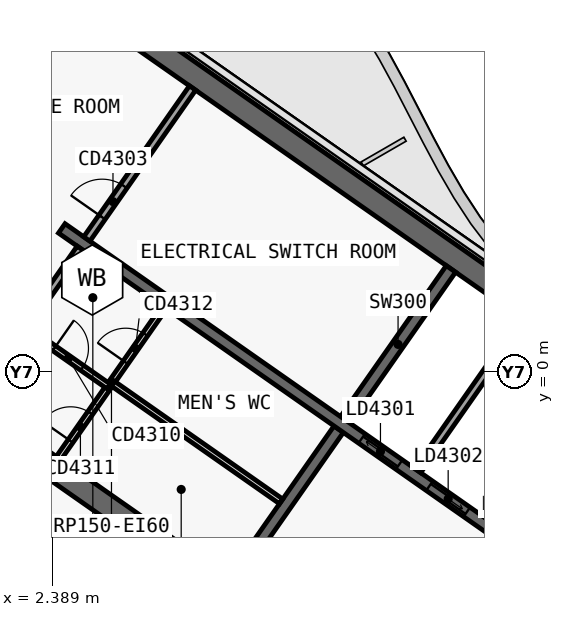
"""IFC4 building model, lengths in metres.
Left out: names, types, materials, properties, quantities, classifications, styles, units other than length and angle.
Written with IfcOpenShell. Run it as: python <this file> out.ifc"""

import sys

from ifc_helpers import new_model, si_unit, direction, frame, frame_2d, origin, place, context, subcontext, project, spatial, polyline, rectangle, outline, extrude, element, fill, save


model = new_model("IFC4")
c1 = context("Model", 3, precision=1e-05, world=origin(), true_north=direction((0.0, 1.0)))
c2 = subcontext(c1, "Body", "Model", "MODEL_VIEW")
j1 = project(units=[si_unit("LENGTHUNIT", "METRE"), si_unit("PLANEANGLEUNIT", "RADIAN")], contexts=[c1])
p1 = place(None, origin())
s1 = spatial("IfcSite", under=j1, at=p1, CompositionType="ELEMENT")
p2 = place(p1, origin())
s2 = spatial("IfcBuilding", under=s1, at=p2, CompositionType="ELEMENT")
p3 = place(p2, frame((0.0, 0.0, 241.0)))
s3 = spatial("IfcBuildingStorey", under=s2, at=p3, CompositionType="ELEMENT", Elevation=241.0)
p4 = place(p3, frame((0.028, 12.066, 0.0), z_axis=(0.0, 0.0, 1.0), x_axis=(0.819151382952, -0.573577380837, 0.0)))
e1 = element("IfcWall", 1, at=p4, inside=s3, PredefinedType="SHEAR", context=c2, shape_type="SweptSolid", body=[
    extrude(outline(polyline([(33.898, 0.3), (0.0, 0.3), (0.42, -0.3), (33.898, -0.3), (33.898, 0.3)])), origin(), (0.0, 0.0, 1.0), 3.9),
])
p5 = place(p3, frame((0.028, -0.874, 0.0), z_axis=(0.0, 0.0, 1.0), x_axis=(0.819150035022, -0.573579305871, 0.0)))
e2 = element("IfcWall", 2, at=p5, inside=s3, PredefinedType="SHEAR", context=c2, shape_type="SweptSolid", body=[
    extrude(outline(polyline([(26.476, 0.3), (0.0, 0.3), (0.42, -0.3), (26.476, -0.3), (26.476, 0.3)])), origin(), (0.0, 0.0, 1.0), 3.9),
])
p6 = place(p5, frame((0.826, 0.0, 0.0)))
e3 = element("IfcOpeningElement", 3, at=p6, cuts=e2, PredefinedType="OPENING", context=c2, shape_type="SweptSolid", body=[
    extrude(rectangle(XDim=1.5, YDim=2.1, at=frame_2d((0.75, 1.05))), frame((0.0, 0.31, 0.0), z_axis=(0.0, -1.0, 0.0), x_axis=(1.0, 0.0, 0.0)), (0.0, 0.0, 1.0), 0.62),
])
p7 = place(p5, frame((12.226, 0.0, 0.0)))
e4 = element("IfcOpeningElement", 4, at=p7, cuts=e2, PredefinedType="OPENING", context=c2, shape_type="SweptSolid", body=[
    extrude(rectangle(XDim=1.5, YDim=2.1, at=frame_2d((0.75, 1.05))), frame((0.0, 0.31, 0.0), z_axis=(0.0, -1.0, 0.0), x_axis=(1.0, 0.0, 0.0)), (0.0, 0.0, 1.0), 0.62),
])
p8 = place(p3, frame((7.143, -5.49, 0.0), z_axis=(0.0, 0.0, 1.0), x_axis=(0.573617744349, 0.819123118565, 0.0)))
e5 = element("IfcWall", 5, at=p8, inside=s3, PredefinedType="SHEAR", context=c2, shape_type="SweptSolid", body=[
    extrude(outline(polyline([(0.0, 0.15), (0.0, -0.15), (4.85, -0.15), (4.85, 0.15), (0.0, 0.15)])), origin(), (0.0, 0.0, 1.0), 3.9),
])
p9 = place(p3, frame((10.097, -1.271, 0.0), z_axis=(0.0, 0.0, 1.0), x_axis=(0.573560315113, 0.819163332265, 0.0)))
e6 = element("IfcWall", 6, at=p9, inside=s3, PredefinedType="SHEAR", context=c2, shape_type="SweptSolid", body=[
    extrude(outline(polyline([(4.85, -0.15), (4.85, 0.15), (0.0, 0.15), (0.0, -0.15), (4.85, -0.15)])), origin(), (0.0, 0.0, 1.0), 3.9),
])
p10 = place(p3, frame((2.638, 3.768, 0.0), z_axis=(0.0, 0.0, 1.0), x_axis=(0.819155014212, -0.573572194837, 0.0)))
e7 = element("IfcWall", 7, at=p10, inside=s3, PredefinedType="SHEAR", context=c2, shape_type="SweptSolid", body=[
    extrude(outline(polyline([(0.0, 0.15), (0.0, -0.15), (26.4, -0.15), (26.4, 0.15), (0.0, 0.15)])), origin(), (0.0, 0.0, 1.0), 3.9),
])
p11 = place(p10, frame((9.637, 0.0, 0.0)))
e8 = element("IfcOpeningElement", 8, at=p11, cuts=e7, PredefinedType="OPENING", context=c2, shape_type="SweptSolid", body=[
    extrude(rectangle(XDim=1.2, YDim=2.1, at=frame_2d((0.6, 1.05))), frame((0.0, 0.16, 0.0), z_axis=(0.0, -1.0, 0.0), x_axis=(1.0, 0.0, 0.0)), (0.0, 0.0, 1.0), 0.32),
])
p12 = place(p10, frame((11.812, 0.0, 0.0)))
e9 = element("IfcOpeningElement", 9, at=p12, cuts=e7, PredefinedType="OPENING", context=c2, shape_type="SweptSolid", body=[
    extrude(rectangle(XDim=1.2, YDim=2.1, at=frame_2d((0.6, 1.05))), frame((0.0, 0.16, 0.0), z_axis=(0.0, -1.0, 0.0), x_axis=(1.0, 0.0, 0.0)), (0.0, 0.0, 1.0), 0.32),
])
p13 = place(p10, frame((13.988, 0.0, 0.0)))
e10 = element("IfcOpeningElement", 10, at=p13, cuts=e7, PredefinedType="OPENING", context=c2, shape_type="SweptSolid", body=[
    extrude(rectangle(XDim=1.2, YDim=2.1, at=frame_2d((0.6, 1.05))), frame((0.0, 0.16, 0.0), z_axis=(0.0, -1.0, 0.0), x_axis=(1.0, 0.0, 0.0)), (0.0, 0.0, 1.0), 0.32),
])
p14 = place(p10, frame((16.262, 0.0, 0.0)))
e11 = element("IfcOpeningElement", 11, at=p14, cuts=e7, PredefinedType="OPENING", context=c2, shape_type="SweptSolid", body=[
    extrude(rectangle(XDim=1.0, YDim=2.1, at=frame_2d((0.5, 1.05))), frame((0.0, 0.16, 0.0), z_axis=(0.0, -1.0, 0.0), x_axis=(1.0, 0.0, 0.0)), (0.0, 0.0, 1.0), 0.32),
])
p15 = place(p3, frame((12.001, -2.605, 0.0), z_axis=(0.0, 0.0, 1.0), x_axis=(0.573560315113, 0.819163332265, 0.0)))
e12 = element("IfcWall", 12, at=p15, inside=s3, PredefinedType="SOLIDWALL", context=c2, shape_type="SweptSolid", body=[
    extrude(rectangle(XDim=4.85, YDim=0.2, at=frame_2d((2.425, 0.0))), origin(), (0.0, 0.0, 1.0), 3.9),
])
p16 = place(p3, frame((13.783, -3.852, 0.0), z_axis=(0.0, 0.0, 1.0), x_axis=(0.573594092424, 0.81913968109, 0.0)))
e13 = element("IfcWall", 13, at=p16, inside=s3, PredefinedType="SOLIDWALL", context=c2, shape_type="SweptSolid", body=[
    extrude(rectangle(XDim=4.85, YDim=0.2, at=frame_2d((2.425, 0.0))), origin(), (0.0, 0.0, 1.0), 3.9),
])
p17 = place(p3, frame((2.556, -2.278, 0.0), z_axis=(0.0, 0.0, 1.0), x_axis=(0.573560315113, 0.819163332265, 0.0)))
e14 = element("IfcWall", 14, at=p17, inside=s3, PredefinedType="PARTITIONING", context=c2, shape_type="SweptSolid", body=[
    extrude(rectangle(XDim=4.85, YDim=0.15, at=frame_2d((2.425, 0.0))), origin(), (0.0, 0.0, 1.0), 3.62),
])
p18 = place(p17, frame((0.55, 0.0, 0.0)))
e15 = element("IfcOpeningElement", 15, at=p18, cuts=e14, PredefinedType="OPENING", context=c2, shape_type="SweptSolid", body=[
    extrude(rectangle(XDim=0.9, YDim=2.1, at=frame_2d((0.45, 1.05))), frame((0.0, 0.085, 0.0), z_axis=(0.0, -1.0, 0.0), x_axis=(1.0, 0.0, 0.0)), (0.0, 0.0, 1.0), 0.17),
])
p19 = place(p17, frame((3.075, 0.0, 0.0)))
e16 = element("IfcOpeningElement", 16, at=p19, cuts=e14, PredefinedType="OPENING", context=c2, shape_type="SweptSolid", body=[
    extrude(rectangle(XDim=0.9, YDim=2.1, at=frame_2d((0.45, 1.05))), frame((0.0, 0.085, 0.0), z_axis=(0.0, -1.0, 0.0), x_axis=(1.0, 0.0, 0.0)), (0.0, 0.0, 1.0), 0.17),
])
p20 = place(p3, frame((1.745, 1.097, 0.0), z_axis=(0.0, 0.0, 1.0), x_axis=(0.819178980414, -0.573537965655, 0.0)))
e17 = element("IfcWall", 17, at=p20, inside=s3, PredefinedType="PARTITIONING", context=c2, shape_type="SweptSolid", body=[
    extrude(rectangle(XDim=2.6, YDim=0.15, at=frame_2d((1.3, 0.0))), origin(), (0.0, 0.0, 1.0), 3.62),
])
p21 = place(p20, frame((0.85, 0.0, 0.0)))
e18 = element("IfcOpeningElement", 18, at=p21, cuts=e17, PredefinedType="OPENING", context=c2, shape_type="SweptSolid", body=[
    extrude(rectangle(XDim=0.9, YDim=2.1, at=frame_2d((0.45, 1.05))), frame((0.0, 0.085, 0.0), z_axis=(0.0, -1.0, 0.0), x_axis=(1.0, 0.0, 0.0)), (0.0, 0.0, 1.0), 0.17),
])
p22 = place(p3, frame((3.947, -0.292, 0.0), z_axis=(0.0, 0.0, 1.0), x_axis=(0.819151939971, -0.573576585332, 0.0)))
e19 = element("IfcWall", 19, at=p22, inside=s3, PredefinedType="PARTITIONING", context=c2, shape_type="SweptSolid", body=[
    extrude(rectangle(XDim=5.45, YDim=0.15, at=frame_2d((2.725, 0.0))), origin(), (0.0, 0.0, 1.0), 3.62),
])
p23 = place(p3, frame((0.344, -0.729, 0.0), z_axis=(0.0, 0.0, 1.0), x_axis=(0.573560315113, 0.819163332265, 0.0)))
e20 = element("IfcWall", 20, at=p23, inside=s3, PredefinedType="SOLIDWALL", context=c2, shape_type="SweptSolid", body=[
    extrude(rectangle(XDim=4.85, YDim=0.2, at=frame_2d((2.425, 0.0))), origin(), (0.0, 0.0, 1.0), 3.62),
])
p24 = place(p23, frame((0.55, 0.0, 0.0)))
e21 = element("IfcOpeningElement", 21, at=p24, cuts=e20, PredefinedType="OPENING", context=c2, shape_type="SweptSolid", body=[
    extrude(rectangle(XDim=0.9, YDim=2.1, at=frame_2d((0.45, 1.05))), frame((0.0, 0.11, 0.0), z_axis=(0.0, -1.0, 0.0), x_axis=(1.0, 0.0, 0.0)), (0.0, 0.0, 1.0), 0.22),
])
p25 = place(p3, frame((3.298, 3.49, 0.0), z_axis=(0.0, 0.0, 1.0), x_axis=(0.573560315113, 0.819163332265, 0.0)))
e22 = element("IfcWall", 22, at=p25, inside=s3, PredefinedType="SOLIDWALL", context=c2, shape_type="SweptSolid", body=[
    extrude(rectangle(XDim=4.85, YDim=0.2, at=frame_2d((2.425, 0.0))), origin(), (0.0, 0.0, 1.0), 3.62),
])
p26 = place(p25, frame((0.7, 0.0, 0.0)))
e23 = element("IfcOpeningElement", 23, at=p26, cuts=e22, PredefinedType="OPENING", context=c2, shape_type="SweptSolid", body=[
    extrude(rectangle(XDim=1.0, YDim=2.1, at=frame_2d((0.5, 1.05))), frame((0.0, 0.11, 0.0), z_axis=(0.0, -1.0, 0.0), x_axis=(1.0, 0.0, 0.0)), (0.0, 0.0, 1.0), 0.22),
])
p27 = place(p11, origin())
e24 = element("IfcDoor", 24, at=p27, inside=s3, OperationType="SLIDING_TO_LEFT", PredefinedType="DOOR", context=c2, shape_type="SweptSolid", body=[
    extrude(rectangle(XDim=1.2, YDim=2.1, at=frame_2d((0.6, 1.05))), frame((0.0, 0.025, 0.0), z_axis=(0.0, -1.0, 0.0), x_axis=(1.0, 0.0, 0.0)), (0.0, 0.0, 1.0), 0.05),
])
fill(e8, e24)
p28 = place(p12, origin())
e25 = element("IfcDoor", 25, at=p28, inside=s3, OperationType="SLIDING_TO_RIGHT", PredefinedType="DOOR", context=c2, shape_type="SweptSolid", body=[
    extrude(rectangle(XDim=1.2, YDim=2.1, at=frame_2d((0.6, 1.05))), frame((0.0, 0.025, 0.0), z_axis=(0.0, -1.0, 0.0), x_axis=(1.0, 0.0, 0.0)), (0.0, 0.0, 1.0), 0.05),
])
fill(e9, e25)
p29 = place(p18, origin())
e26 = element("IfcDoor", 26, at=p29, inside=s3, OperationType="SINGLE_SWING_RIGHT", PredefinedType="DOOR", context=c2, shape_type="SweptSolid", body=[
    extrude(rectangle(XDim=0.9, YDim=2.1, at=frame_2d((0.45, 1.05))), frame((0.0, 0.025, 0.0), z_axis=(0.0, -1.0, 0.0), x_axis=(1.0, 0.0, 0.0)), (0.0, 0.0, 1.0), 0.05),
])
fill(e15, e26)
p30 = place(p21, origin())
e27 = element("IfcDoor", 27, at=p30, inside=s3, OperationType="SINGLE_SWING_RIGHT", PredefinedType="DOOR", context=c2, shape_type="SweptSolid", body=[
    extrude(rectangle(XDim=0.9, YDim=2.1, at=frame_2d((0.45, 1.05))), frame((0.0, 0.025, 0.0), z_axis=(0.0, -1.0, 0.0), x_axis=(1.0, 0.0, 0.0)), (0.0, 0.0, 1.0), 0.05),
])
fill(e18, e27)
p31 = place(p19, origin())
e28 = element("IfcDoor", 28, at=p31, inside=s3, OperationType="SINGLE_SWING_RIGHT", PredefinedType="DOOR", context=c2, shape_type="SweptSolid", body=[
    extrude(rectangle(XDim=0.9, YDim=2.1, at=frame_2d((0.45, 1.05))), frame((0.0, 0.025, 0.0), z_axis=(0.0, -1.0, 0.0), x_axis=(1.0, 0.0, 0.0)), (0.0, 0.0, 1.0), 0.05),
])
fill(e16, e28)
p32 = place(p26, origin())
e29 = element("IfcDoor", 29, at=p32, inside=s3, OperationType="SINGLE_SWING_RIGHT", PredefinedType="DOOR", context=c2, shape_type="SweptSolid", body=[
    extrude(rectangle(XDim=1.0, YDim=2.1, at=frame_2d((0.5, 1.05))), frame((0.0, 0.025, 0.0), z_axis=(0.0, -1.0, 0.0), x_axis=(1.0, 0.0, 0.0)), (0.0, 0.0, 1.0), 0.05),
])
fill(e23, e29)
save(model, sys.argv[1])
